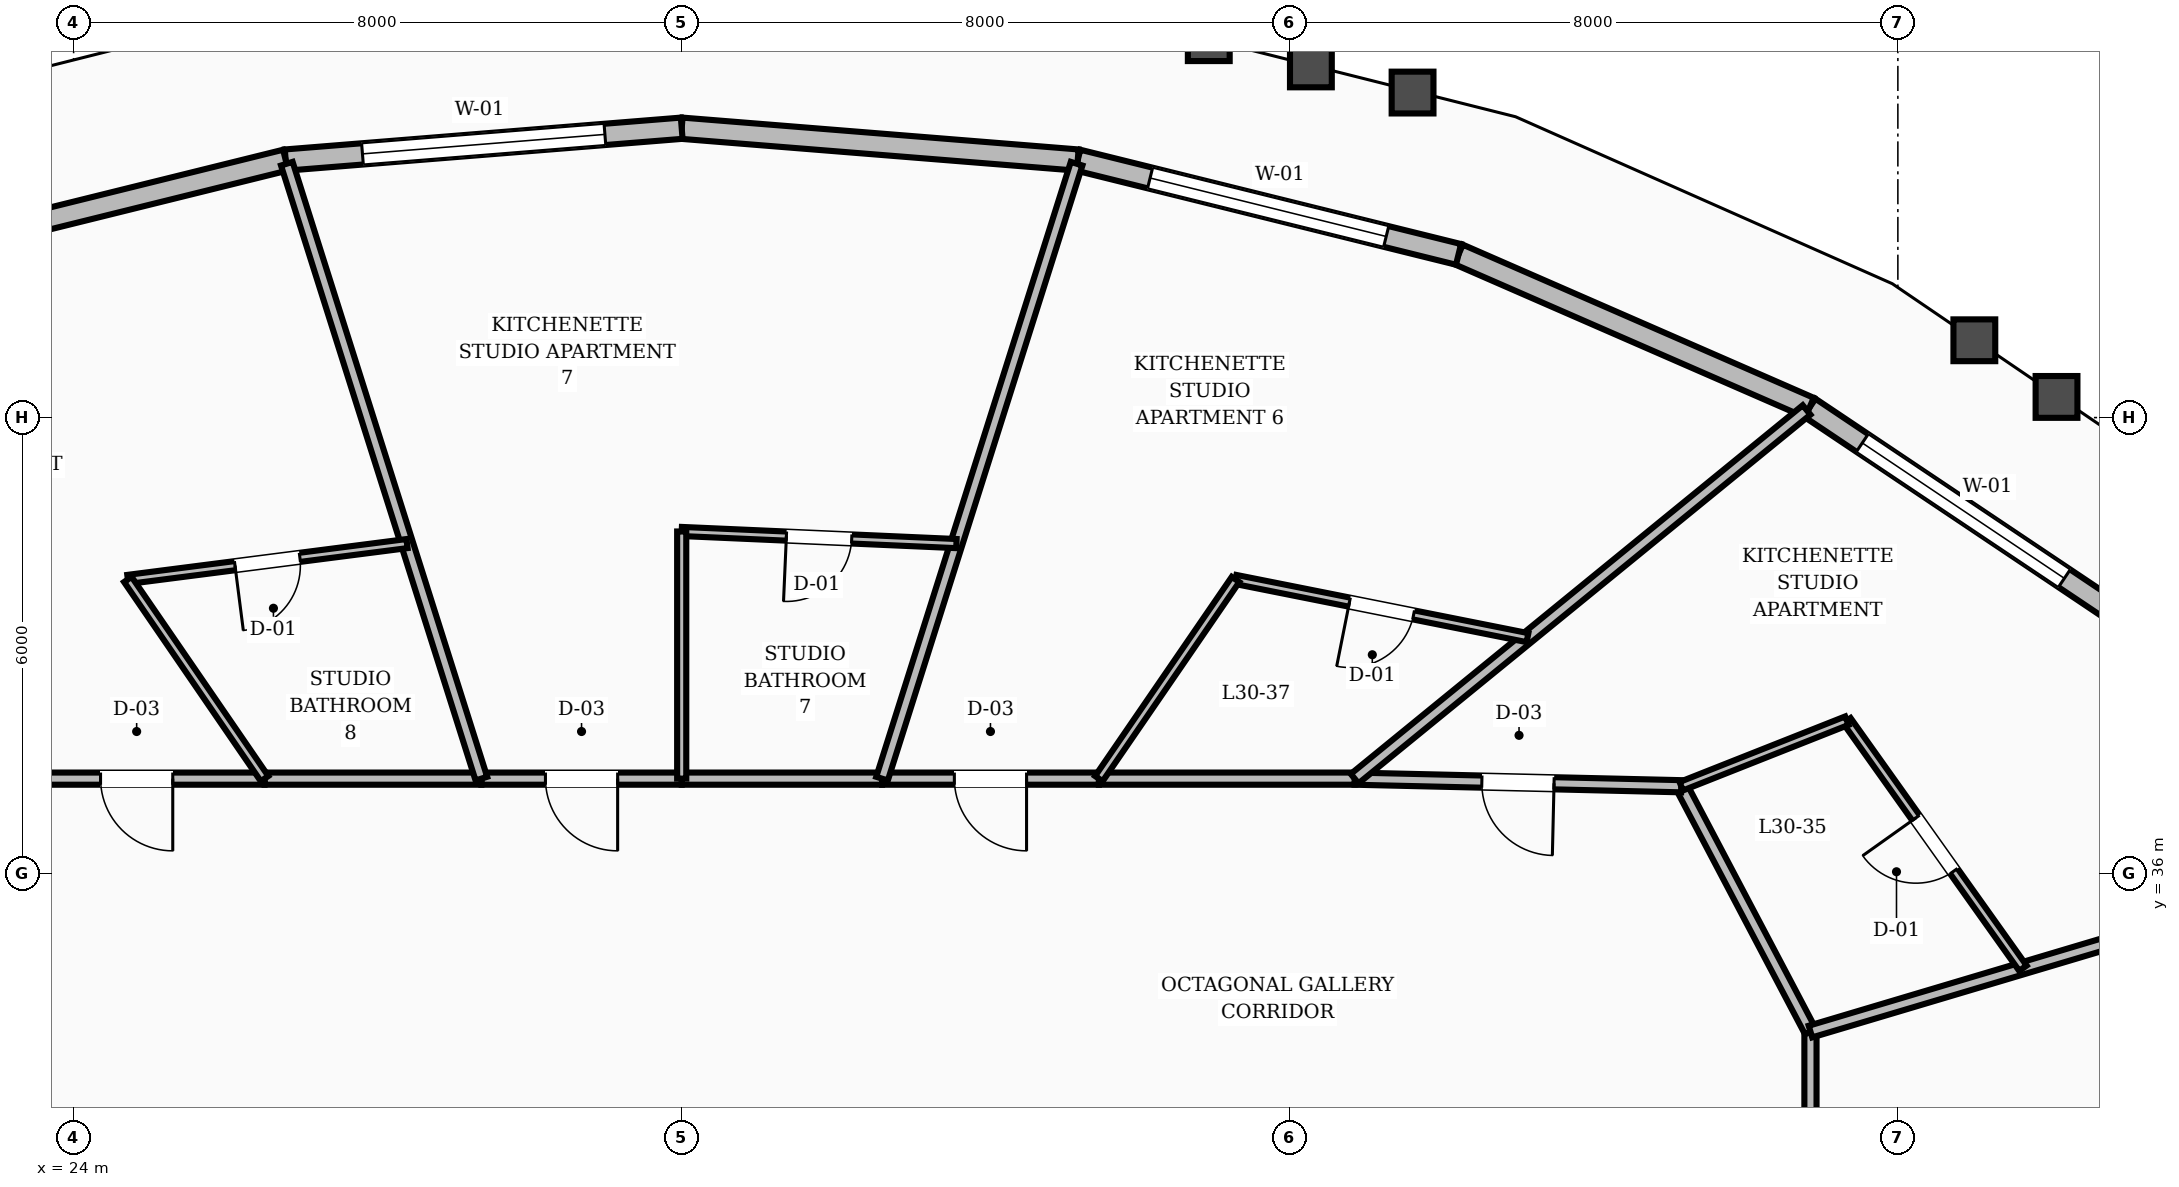
"""IFC4 building model, lengths in metres.
Left out: names, types, materials, properties, quantities, classifications, styles, units other than length and angle.
Written with IfcOpenShell. Run it as: python <this file> out.ifc"""

import sys

from ifc_helpers import new_model, si_unit, direction, frame, frame_2d, origin, place, context, subcontext, project, spatial, rectangle, extrude, element, fill, save


model = new_model("IFC4")
c1 = context("Model", 3, precision=1e-05, world=origin(), true_north=direction((0.0, 1.0)))
c2 = subcontext(c1, "Body", "Model", "MODEL_VIEW")
j1 = project(units=[si_unit("LENGTHUNIT", "METRE"), si_unit("PLANEANGLEUNIT", "RADIAN")], contexts=[c1])
p1 = place(None, origin())
s1 = spatial("IfcSite", under=j1, at=p1, CompositionType="ELEMENT")
p2 = place(p1, origin())
s2 = spatial("IfcBuilding", under=s1, at=p2, CompositionType="ELEMENT")
p3 = place(p2, frame((0.0, 0.0, 120.8)))
s3 = spatial("IfcBuildingStorey", under=s2, at=p3, CompositionType="ELEMENT", Elevation=120.8)
p4 = place(p3, frame((50.885, 39.42, 0.0), z_axis=(0.0, 0.0, 1.0), x_axis=(-0.830737301714, 0.556664652678, 0.0)))
e1 = element("IfcWall", 1, at=p4, inside=s3, PredefinedType="STANDARD", context=c2, shape_type="SweptSolid", body=[
    extrude(rectangle(XDim=4.872, YDim=0.28, at=frame_2d((2.436, 0.0))), origin(), (0.0, 0.0, 1.0), 2.82),
])
p5 = place(p4, frame((0.836, 0.0, 0.8)))
e2 = element("IfcOpeningElement", 2, at=p5, cuts=e1, PredefinedType="OPENING", context=c2, shape_type="SweptSolid", body=[
    extrude(rectangle(XDim=3.2, YDim=1.65, at=frame_2d((1.6, 0.825))), frame((0.0, 0.15, 0.0), z_axis=(0.0, -1.0, 0.0), x_axis=(1.0, 0.0, 0.0)), (0.0, 0.0, 1.0), 0.3),
])
p6 = place(p3, frame((46.838, 42.132, 0.0), z_axis=(0.0, 0.0, 1.0), x_axis=(-0.916520644769, 0.399987384441, 0.0)))
e3 = element("IfcWall", 3, at=p6, inside=s3, PredefinedType="STANDARD", context=c2, shape_type="SweptSolid", body=[
    extrude(rectangle(XDim=5.038, YDim=0.28, at=frame_2d((2.519, 0.0))), origin(), (0.0, 0.0, 1.0), 2.82),
])
p7 = place(p3, frame((42.22, 44.147, 0.0), z_axis=(0.0, 0.0, 1.0), x_axis=(-0.970666096737, 0.240431546694, 0.0)))
e4 = element("IfcWall", 4, at=p7, inside=s3, PredefinedType="STANDARD", context=c2, shape_type="SweptSolid", body=[
    extrude(rectangle(XDim=5.161, YDim=0.28, at=frame_2d((2.581, 0.0))), origin(), (0.0, 0.0, 1.0), 2.82),
])
p8 = place(p7, frame((0.981, 0.0, 0.8)))
e5 = element("IfcOpeningElement", 5, at=p8, cuts=e4, PredefinedType="OPENING", context=c2, shape_type="SweptSolid", body=[
    extrude(rectangle(XDim=3.2, YDim=1.65, at=frame_2d((1.6, 0.825))), frame((0.0, 0.15, 0.0), z_axis=(0.0, -1.0, 0.0), x_axis=(1.0, 0.0, 0.0)), (0.0, 0.0, 1.0), 0.3),
])
p9 = place(p3, frame((37.21, 45.388, 0.0), z_axis=(0.0, 0.0, 1.0), x_axis=(-0.996782820501, 0.080149914249, 0.0)))
e6 = element("IfcWall", 6, at=p9, inside=s3, PredefinedType="STANDARD", context=c2, shape_type="SweptSolid", body=[
    extrude(rectangle(XDim=5.227, YDim=0.28, at=frame_2d((2.614, 0.0))), origin(), (0.0, 0.0, 1.0), 2.82),
])
p10 = place(p3, frame((32.0, 45.807, 0.0), z_axis=(0.0, 0.0, 1.0), x_axis=(-0.996782820501, -0.080149914249, 0.0)))
e7 = element("IfcWall", 7, at=p10, inside=s3, PredefinedType="STANDARD", context=c2, shape_type="SweptSolid", body=[
    extrude(rectangle(XDim=5.227, YDim=0.28, at=frame_2d((2.614, 0.0))), origin(), (0.0, 0.0, 1.0), 2.82),
])
p11 = place(p10, frame((1.014, 0.0, 0.8)))
e8 = element("IfcOpeningElement", 8, at=p11, cuts=e7, PredefinedType="OPENING", context=c2, shape_type="SweptSolid", body=[
    extrude(rectangle(XDim=3.2, YDim=1.65, at=frame_2d((1.6, 0.825))), frame((0.0, 0.15, 0.0), z_axis=(0.0, -1.0, 0.0), x_axis=(1.0, 0.0, 0.0)), (0.0, 0.0, 1.0), 0.3),
])
p12 = place(p3, frame((26.79, 45.388, 0.0), z_axis=(0.0, 0.0, 1.0), x_axis=(-0.970666096737, -0.240431546694, 0.0)))
e9 = element("IfcWall", 9, at=p12, inside=s3, PredefinedType="STANDARD", context=c2, shape_type="SweptSolid", body=[
    extrude(rectangle(XDim=5.161, YDim=0.28, at=frame_2d((2.581, 0.0))), origin(), (0.0, 0.0, 1.0), 2.82),
])
p13 = place(p3, frame((46.85, 30.151, 0.0), z_axis=(0.0, 0.0, 1.0), x_axis=(0.0, 1.0, 0.0)))
e10 = element("IfcWall", 10, at=p13, inside=s3, PredefinedType="SOLIDWALL", context=c2, shape_type="SweptSolid", body=[
    extrude(rectangle(XDim=3.771, YDim=0.16, at=frame_2d((1.886, 0.0))), origin(), (0.0, 0.0, 1.0), 2.8),
])
p14 = place(p13, frame((1.411, 0.0, 0.0)))
e11 = element("IfcOpeningElement", 11, at=p14, cuts=e10, PredefinedType="OPENING", context=c2, shape_type="SweptSolid", body=[
    extrude(rectangle(XDim=0.95, YDim=2.1, at=frame_2d((0.475, 1.05))), frame((0.0, 0.09, 0.0), z_axis=(0.0, -1.0, 0.0), x_axis=(1.0, 0.0, 0.0)), (0.0, 0.0, 1.0), 0.18),
])
p15 = place(p3, frame((46.85, 33.923, 0.0), z_axis=(0.0, 0.0, 1.0), x_axis=(-0.466093963429, 0.884735224378, 0.0)))
e12 = element("IfcWall", 12, at=p15, inside=s3, PredefinedType="SOLIDWALL", context=c2, shape_type="SweptSolid", body=[
    extrude(rectangle(XDim=3.648, YDim=0.16, at=frame_2d((1.824, 0.0))), origin(), (0.0, 0.0, 1.0), 2.8),
])
p16 = place(p3, frame((45.15, 37.15, 0.0), z_axis=(0.0, 0.0, 1.0), x_axis=(-0.999728709658, 0.023291781507, 0.0)))
e13 = element("IfcWall", 13, at=p16, inside=s3, PredefinedType="SOLIDWALL", context=c2, shape_type="SweptSolid", body=[
    extrude(rectangle(XDim=4.298, YDim=0.16, at=frame_2d((2.149, 0.0))), origin(), (0.0, 0.0, 1.0), 2.8),
])
p17 = place(p16, frame((1.674, 0.0, 0.0)))
e14 = element("IfcOpeningElement", 14, at=p17, cuts=e13, PredefinedType="OPENING", context=c2, shape_type="SweptSolid", body=[
    extrude(rectangle(XDim=0.95, YDim=2.1, at=frame_2d((0.475, 1.05))), frame((0.0, 0.09, 0.0), z_axis=(0.0, -1.0, 0.0), x_axis=(1.0, 0.0, 0.0)), (0.0, 0.0, 1.0), 0.18),
])
p18 = place(p3, frame((40.854, 37.25, 0.0), z_axis=(0.0, 0.0, 1.0), x_axis=(-1.0, 0.0, 0.0)))
e15 = element("IfcWall", 15, at=p18, inside=s3, PredefinedType="SOLIDWALL", context=c2, shape_type="SweptSolid", body=[
    extrude(rectangle(XDim=3.365, YDim=0.16, at=frame_2d((1.683, 0.0))), origin(), (0.0, 0.0, 1.0), 2.8),
])
p19 = place(p3, frame((37.488, 37.25, 0.0), z_axis=(0.0, 0.0, 1.0), x_axis=(-1.0, 0.0, 0.0)))
e16 = element("IfcWall", 16, at=p19, inside=s3, PredefinedType="SOLIDWALL", context=c2, shape_type="SweptSolid", body=[
    extrude(rectangle(XDim=2.853, YDim=0.16, at=frame_2d((1.426, 0.0))), origin(), (0.0, 0.0, 1.0), 2.8),
])
p20 = place(p19, frame((0.951, 0.0, 0.0)))
e17 = element("IfcOpeningElement", 17, at=p20, cuts=e16, PredefinedType="OPENING", context=c2, shape_type="SweptSolid", body=[
    extrude(rectangle(XDim=0.95, YDim=2.1, at=frame_2d((0.475, 1.05))), frame((0.0, 0.09, 0.0), z_axis=(0.0, -1.0, 0.0), x_axis=(1.0, 0.0, 0.0)), (0.0, 0.0, 1.0), 0.18),
])
p21 = place(p3, frame((34.635, 37.25, 0.0), z_axis=(0.0, 0.0, 1.0), x_axis=(-1.0, 0.0, 0.0)))
e18 = element("IfcWall", 18, at=p21, inside=s3, PredefinedType="SOLIDWALL", context=c2, shape_type="SweptSolid", body=[
    extrude(rectangle(XDim=2.635, YDim=0.16, at=frame_2d((1.318, 0.0))), origin(), (0.0, 0.0, 1.0), 2.8),
])
p22 = place(p3, frame((32.0, 37.25, 0.0), z_axis=(0.0, 0.0, 1.0), x_axis=(-1.0, 0.0, 0.0)))
e19 = element("IfcWall", 19, at=p22, inside=s3, PredefinedType="SOLIDWALL", context=c2, shape_type="SweptSolid", body=[
    extrude(rectangle(XDim=2.635, YDim=0.16, at=frame_2d((1.318, 0.0))), origin(), (0.0, 0.0, 1.0), 2.8),
])
p23 = place(p22, frame((0.843, 0.0, 0.0)))
e20 = element("IfcOpeningElement", 20, at=p23, cuts=e19, PredefinedType="OPENING", context=c2, shape_type="SweptSolid", body=[
    extrude(rectangle(XDim=0.95, YDim=2.1, at=frame_2d((0.475, 1.05))), frame((0.0, 0.09, 0.0), z_axis=(0.0, -1.0, 0.0), x_axis=(1.0, 0.0, 0.0)), (0.0, 0.0, 1.0), 0.18),
])
p24 = place(p3, frame((29.365, 37.25, 0.0), z_axis=(0.0, 0.0, 1.0), x_axis=(-1.0, 0.0, 0.0)))
e21 = element("IfcWall", 21, at=p24, inside=s3, PredefinedType="SOLIDWALL", context=c2, shape_type="SweptSolid", body=[
    extrude(rectangle(XDim=2.853, YDim=0.16, at=frame_2d((1.426, 0.0))), origin(), (0.0, 0.0, 1.0), 2.8),
])
p25 = place(p3, frame((26.512, 37.25, 0.0), z_axis=(0.0, 0.0, 1.0), x_axis=(-1.0, 0.0, 0.0)))
e22 = element("IfcWall", 22, at=p25, inside=s3, PredefinedType="SOLIDWALL", context=c2, shape_type="SweptSolid", body=[
    extrude(rectangle(XDim=3.365, YDim=0.16, at=frame_2d((1.683, 0.0))), origin(), (0.0, 0.0, 1.0), 2.8),
])
p26 = place(p25, frame((1.208, 0.0, 0.0)))
e23 = element("IfcOpeningElement", 23, at=p26, cuts=e22, PredefinedType="OPENING", context=c2, shape_type="SweptSolid", body=[
    extrude(rectangle(XDim=0.95, YDim=2.1, at=frame_2d((0.475, 1.05))), frame((0.0, 0.09, 0.0), z_axis=(0.0, -1.0, 0.0), x_axis=(1.0, 0.0, 0.0)), (0.0, 0.0, 1.0), 0.18),
])
p27 = place(p3, frame((46.85, 33.923, 0.0), z_axis=(0.0, 0.0, 1.0), x_axis=(0.958328823474, 0.285667404685, 0.0)))
e24 = element("IfcWall", 24, at=p27, inside=s3, PredefinedType="SOLIDWALL", context=c2, shape_type="SweptSolid", body=[
    extrude(rectangle(XDim=7.626, YDim=0.16, at=frame_2d((3.813, 0.0))), origin(), (0.0, 0.0, 1.0), 2.8),
])
p28 = place(p3, frame((49.645, 34.756, 0.0), z_axis=(0.0, 0.0, 1.0), x_axis=(-0.579584195977, 0.814912363248, 0.0)))
e25 = element("IfcWall", 25, at=p28, inside=s3, PredefinedType="PARTITIONING", context=c2, shape_type="SweptSolid", body=[
    extrude(rectangle(XDim=3.996, YDim=0.12, at=frame_2d((1.998, 0.0))), origin(), (0.0, 0.0, 1.0), 2.8),
])
p29 = place(p28, frame((1.568, 0.0, 0.0)))
e26 = element("IfcOpeningElement", 26, at=p29, cuts=e25, PredefinedType="OPENING", context=c2, shape_type="SweptSolid", body=[
    extrude(rectangle(XDim=0.86, YDim=2.1, at=frame_2d((0.43, 1.05))), frame((0.0, 0.07, 0.0), z_axis=(0.0, -1.0, 0.0), x_axis=(1.0, 0.0, 0.0)), (0.0, 0.0, 1.0), 0.14),
])
p30 = place(p3, frame((45.15, 37.15, 0.0), z_axis=(0.0, 0.0, 1.0), x_axis=(0.929814039577, 0.368029688755, 0.0)))
e27 = element("IfcWall", 27, at=p30, inside=s3, PredefinedType="PARTITIONING", context=c2, shape_type="SweptSolid", body=[
    extrude(rectangle(XDim=2.344, YDim=0.12, at=frame_2d((1.172, 0.0))), origin(), (0.0, 0.0, 1.0), 2.8),
])
p31 = place(p3, frame((40.854, 37.25, 0.0), z_axis=(0.0, 0.0, 1.0), x_axis=(0.774866661355, 0.632124716429, 0.0)))
e28 = element("IfcWall", 28, at=p31, inside=s3, PredefinedType="SOLIDWALL", context=c2, shape_type="SweptSolid", body=[
    extrude(rectangle(XDim=7.673, YDim=0.16, at=frame_2d((3.836, 0.0))), origin(), (0.0, 0.0, 1.0), 2.8),
])
p32 = place(p3, frame((43.127, 39.105, 0.0), z_axis=(0.0, 0.0, 1.0), x_axis=(-0.980693200797, 0.195552667868, 0.0)))
e29 = element("IfcWall", 29, at=p32, inside=s3, PredefinedType="PARTITIONING", context=c2, shape_type="SweptSolid", body=[
    extrude(rectangle(XDim=3.917, YDim=0.12, at=frame_2d((1.958, 0.0))), origin(), (0.0, 0.0, 1.0), 2.8),
])
p33 = place(p32, frame((1.528, 0.0, 0.0)))
e30 = element("IfcOpeningElement", 30, at=p33, cuts=e29, PredefinedType="OPENING", context=c2, shape_type="SweptSolid", body=[
    extrude(rectangle(XDim=0.86, YDim=2.1, at=frame_2d((0.43, 1.05))), frame((0.0, 0.07, 0.0), z_axis=(0.0, -1.0, 0.0), x_axis=(1.0, 0.0, 0.0)), (0.0, 0.0, 1.0), 0.14),
])
p34 = place(p3, frame((37.488, 37.25, 0.0), z_axis=(0.0, 0.0, 1.0), x_axis=(0.56578208736, 0.824554806925, 0.0)))
e31 = element("IfcWall", 31, at=p34, inside=s3, PredefinedType="PARTITIONING", context=c2, shape_type="SweptSolid", body=[
    extrude(rectangle(XDim=3.178, YDim=0.12, at=frame_2d((1.589, 0.0))), origin(), (0.0, 0.0, 1.0), 2.8),
])
p35 = place(p3, frame((34.635, 37.25, 0.0), z_axis=(0.0, 0.0, 1.0), x_axis=(0.30167247597, 0.953411620048, 0.0)))
e32 = element("IfcWall", 32, at=p35, inside=s3, PredefinedType="SOLIDWALL", context=c2, shape_type="SweptSolid", body=[
    extrude(rectangle(XDim=8.485, YDim=0.16, at=frame_2d((4.243, 0.0))), origin(), (0.0, 0.0, 1.0), 2.8),
])
p36 = place(p3, frame((35.614, 40.342, 0.0), z_axis=(0.0, 0.0, 1.0), x_axis=(-0.999028453428, 0.044069822339, 0.0)))
e33 = element("IfcWall", 33, at=p36, inside=s3, PredefinedType="PARTITIONING", context=c2, shape_type="SweptSolid", body=[
    extrude(rectangle(XDim=3.617, YDim=0.12, at=frame_2d((1.809, 0.0))), origin(), (0.0, 0.0, 1.0), 2.8),
])
p37 = place(p36, frame((1.379, 0.0, 0.0)))
e34 = element("IfcOpeningElement", 34, at=p37, cuts=e33, PredefinedType="OPENING", context=c2, shape_type="SweptSolid", body=[
    extrude(rectangle(XDim=0.86, YDim=2.1, at=frame_2d((0.43, 1.05))), frame((0.0, 0.07, 0.0), z_axis=(0.0, -1.0, 0.0), x_axis=(1.0, 0.0, 0.0)), (0.0, 0.0, 1.0), 0.14),
])
p38 = place(p3, frame((32.0, 37.25, 0.0), z_axis=(0.0, 0.0, 1.0), x_axis=(0.0, 1.0, 0.0)))
e35 = element("IfcWall", 35, at=p38, inside=s3, PredefinedType="PARTITIONING", context=c2, shape_type="SweptSolid", body=[
    extrude(rectangle(XDim=3.252, YDim=0.12, at=frame_2d((1.626, 0.0))), origin(), (0.0, 0.0, 1.0), 2.8),
])
p39 = place(p3, frame((29.365, 37.25, 0.0), z_axis=(0.0, 0.0, 1.0), x_axis=(-0.30167247597, 0.953411620048, 0.0)))
e36 = element("IfcWall", 36, at=p39, inside=s3, PredefinedType="SOLIDWALL", context=c2, shape_type="SweptSolid", body=[
    extrude(rectangle(XDim=8.485, YDim=0.16, at=frame_2d((4.243, 0.0))), origin(), (0.0, 0.0, 1.0), 2.8),
])
p40 = place(p3, frame((28.386, 40.342, 0.0), z_axis=(0.0, 0.0, 1.0), x_axis=(-0.991861607412, -0.127320665021, 0.0)))
e37 = element("IfcWall", 37, at=p40, inside=s3, PredefinedType="PARTITIONING", context=c2, shape_type="SweptSolid", body=[
    extrude(rectangle(XDim=3.703, YDim=0.12, at=frame_2d((1.851, 0.0))), origin(), (0.0, 0.0, 1.0), 2.8),
])
p41 = place(p40, frame((1.421, 0.0, 0.0)))
e38 = element("IfcOpeningElement", 38, at=p41, cuts=e37, PredefinedType="OPENING", context=c2, shape_type="SweptSolid", body=[
    extrude(rectangle(XDim=0.86, YDim=2.1, at=frame_2d((0.43, 1.05))), frame((0.0, 0.07, 0.0), z_axis=(0.0, -1.0, 0.0), x_axis=(1.0, 0.0, 0.0)), (0.0, 0.0, 1.0), 0.14),
])
p42 = place(p3, frame((26.512, 37.25, 0.0), z_axis=(0.0, 0.0, 1.0), x_axis=(-0.56578208736, 0.824554806925, 0.0)))
e39 = element("IfcWall", 39, at=p42, inside=s3, PredefinedType="PARTITIONING", context=c2, shape_type="SweptSolid", body=[
    extrude(rectangle(XDim=3.178, YDim=0.12, at=frame_2d((1.589, 0.0))), origin(), (0.0, 0.0, 1.0), 2.8),
])
p43 = place(p5, origin())
e40 = element("IfcWindow", 40, at=p43, inside=s3, PartitioningType="SINGLE_PANEL", PredefinedType="WINDOW", context=c2, shape_type="SweptSolid", body=[
    extrude(rectangle(XDim=3.2, YDim=1.65, at=frame_2d((1.6, 0.825))), frame((0.0, 0.03, 0.0), z_axis=(0.0, -1.0, 0.0), x_axis=(1.0, 0.0, 0.0)), (0.0, 0.0, 1.0), 0.06),
])
fill(e2, e40)
p44 = place(p8, origin())
e41 = element("IfcWindow", 41, at=p44, inside=s3, PartitioningType="SINGLE_PANEL", PredefinedType="WINDOW", context=c2, shape_type="SweptSolid", body=[
    extrude(rectangle(XDim=3.2, YDim=1.65, at=frame_2d((1.6, 0.825))), frame((0.0, 0.03, 0.0), z_axis=(0.0, -1.0, 0.0), x_axis=(1.0, 0.0, 0.0)), (0.0, 0.0, 1.0), 0.06),
])
fill(e5, e41)
p45 = place(p11, origin())
e42 = element("IfcWindow", 42, at=p45, inside=s3, PartitioningType="SINGLE_PANEL", PredefinedType="WINDOW", context=c2, shape_type="SweptSolid", body=[
    extrude(rectangle(XDim=3.2, YDim=1.65, at=frame_2d((1.6, 0.825))), frame((0.0, 0.03, 0.0), z_axis=(0.0, -1.0, 0.0), x_axis=(1.0, 0.0, 0.0)), (0.0, 0.0, 1.0), 0.06),
])
fill(e8, e42)
p46 = place(p29, origin())
e43 = element("IfcDoor", 43, at=p46, inside=s3, OperationType="SINGLE_SWING_RIGHT", PredefinedType="DOOR", context=c2, shape_type="SweptSolid", body=[
    extrude(rectangle(XDim=0.86, YDim=2.1, at=frame_2d((0.43, 1.05))), frame((0.0, 0.025, 0.0), z_axis=(0.0, -1.0, 0.0), x_axis=(1.0, 0.0, 0.0)), (0.0, 0.0, 1.0), 0.05),
])
fill(e26, e43)
p47 = place(p17, origin())
e44 = element("IfcDoor", 44, at=p47, inside=s3, OperationType="SINGLE_SWING_LEFT", PredefinedType="DOOR", context=c2, shape_type="SweptSolid", body=[
    extrude(rectangle(XDim=0.95, YDim=2.1, at=frame_2d((0.475, 1.05))), frame((0.0, 0.025, 0.0), z_axis=(0.0, -1.0, 0.0), x_axis=(1.0, 0.0, 0.0)), (0.0, 0.0, 1.0), 0.05),
])
fill(e14, e44)
p48 = place(p33, origin())
e45 = element("IfcDoor", 45, at=p48, inside=s3, OperationType="SINGLE_SWING_RIGHT", PredefinedType="DOOR", context=c2, shape_type="SweptSolid", body=[
    extrude(rectangle(XDim=0.86, YDim=2.1, at=frame_2d((0.43, 1.05))), frame((0.0, 0.025, 0.0), z_axis=(0.0, -1.0, 0.0), x_axis=(1.0, 0.0, 0.0)), (0.0, 0.0, 1.0), 0.05),
])
fill(e30, e45)
p49 = place(p20, origin())
e46 = element("IfcDoor", 46, at=p49, inside=s3, OperationType="SINGLE_SWING_LEFT", PredefinedType="DOOR", context=c2, shape_type="SweptSolid", body=[
    extrude(rectangle(XDim=0.95, YDim=2.1, at=frame_2d((0.475, 1.05))), frame((0.0, 0.025, 0.0), z_axis=(0.0, -1.0, 0.0), x_axis=(1.0, 0.0, 0.0)), (0.0, 0.0, 1.0), 0.05),
])
fill(e17, e46)
p50 = place(p37, origin())
e47 = element("IfcDoor", 47, at=p50, inside=s3, OperationType="SINGLE_SWING_RIGHT", PredefinedType="DOOR", context=c2, shape_type="SweptSolid", body=[
    extrude(rectangle(XDim=0.86, YDim=2.1, at=frame_2d((0.43, 1.05))), frame((0.0, 0.025, 0.0), z_axis=(0.0, -1.0, 0.0), x_axis=(1.0, 0.0, 0.0)), (0.0, 0.0, 1.0), 0.05),
])
fill(e34, e47)
p51 = place(p23, origin())
e48 = element("IfcDoor", 48, at=p51, inside=s3, OperationType="SINGLE_SWING_LEFT", PredefinedType="DOOR", context=c2, shape_type="SweptSolid", body=[
    extrude(rectangle(XDim=0.95, YDim=2.1, at=frame_2d((0.475, 1.05))), frame((0.0, 0.025, 0.0), z_axis=(0.0, -1.0, 0.0), x_axis=(1.0, 0.0, 0.0)), (0.0, 0.0, 1.0), 0.05),
])
fill(e20, e48)
p52 = place(p41, origin())
e49 = element("IfcDoor", 49, at=p52, inside=s3, OperationType="SINGLE_SWING_RIGHT", PredefinedType="DOOR", context=c2, shape_type="SweptSolid", body=[
    extrude(rectangle(XDim=0.86, YDim=2.1, at=frame_2d((0.43, 1.05))), frame((0.0, 0.025, 0.0), z_axis=(0.0, -1.0, 0.0), x_axis=(1.0, 0.0, 0.0)), (0.0, 0.0, 1.0), 0.05),
])
fill(e38, e49)
p53 = place(p26, origin())
e50 = element("IfcDoor", 50, at=p53, inside=s3, OperationType="SINGLE_SWING_LEFT", PredefinedType="DOOR", context=c2, shape_type="SweptSolid", body=[
    extrude(rectangle(XDim=0.95, YDim=2.1, at=frame_2d((0.475, 1.05))), frame((0.0, 0.025, 0.0), z_axis=(0.0, -1.0, 0.0), x_axis=(1.0, 0.0, 0.0)), (0.0, 0.0, 1.0), 0.05),
])
fill(e23, e50)
save(model, sys.argv[1])
